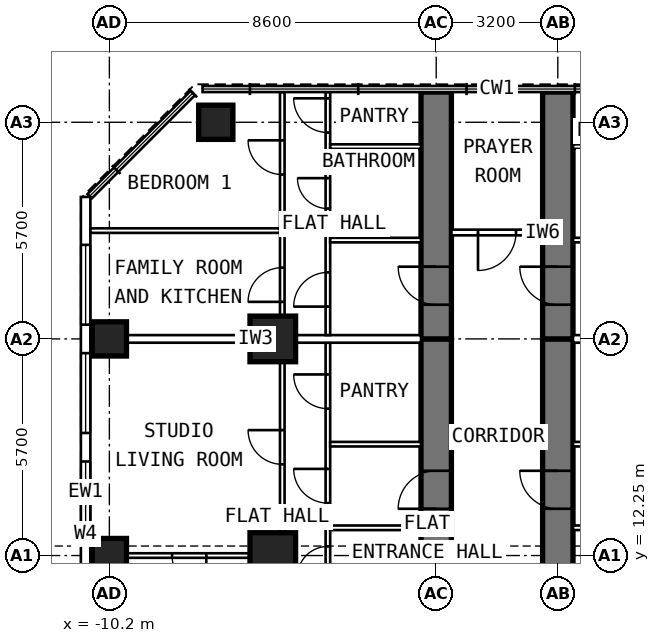
"""IFC4 building model, lengths in metres.
Left out: names, types, materials, properties, quantities, classifications, styles, units other than length and angle.
Written with IfcOpenShell. Run it as: python <this file> out.ifc"""

import sys

from ifc_helpers import new_model, si_unit, direction, frame, frame_2d, origin, origin_2d, place, context, subcontext, project, spatial, rectangle, extrude, element, fill, save


model = new_model("IFC4")
c1 = context("Model", 3, precision=1e-05, world=origin(), true_north=direction((0.0, 1.0)))
c2 = subcontext(c1, "Body", "Model", "MODEL_VIEW")
j1 = project(units=[si_unit("LENGTHUNIT", "METRE"), si_unit("PLANEANGLEUNIT", "RADIAN")], contexts=[c1])
p1 = place(None, origin())
s1 = spatial("IfcSite", under=j1, at=p1, CompositionType="ELEMENT")
p2 = place(p1, origin())
s2 = spatial("IfcBuilding", under=s1, at=p2, CompositionType="ELEMENT")
p3 = place(p2, frame((0.0, 0.0, 179.6)))
s3 = spatial("IfcBuildingStorey", under=s2, at=p3, CompositionType="ELEMENT", Elevation=179.6)
for number, where, z_axis, x_axis in (
    (1, (-10.2, 12.25, 0.0), (0.0, 0.0, 1.0), (0.0, 1.0, 0.0)),
    (2, (-10.2, 17.95, 0.0), (0.0, 0.0, 1.0), (0.0, 1.0, 0.0)),
    (3, (-7.4, 23.65, 0.0), (0.0, 0.0, 1.0), (0.0, 1.0, 0.0)),
):
    element("IfcColumn", number, at=place(p3, frame(where, z_axis=z_axis, x_axis=x_axis)), inside=s3, PredefinedType="COLUMN", context=c2, shape_type="SweptSolid", body=[
        extrude(rectangle(XDim=0.9, YDim=0.9, at=origin_2d()), origin(), (0.0, 0.0, 1.0), 3.6),
    ])
for number, where, z_axis, x_axis in (
    (4, (-5.9, 12.25, 0.0), (0.0, 0.0, 1.0), (0.0, 1.0, 0.0)),
    (5, (-5.9, 17.95, 0.0), (0.0, 0.0, 1.0), (0.0, 1.0, 0.0)),
):
    element("IfcColumn", number, at=place(p3, frame(where, z_axis=z_axis, x_axis=x_axis)), inside=s3, PredefinedType="COLUMN", context=c2, shape_type="SweptSolid", body=[
        extrude(rectangle(XDim=1.2, YDim=1.2, at=origin_2d()), origin(), (0.0, 0.0, 1.0), 3.6),
    ])
p4 = place(p3, frame((-1.6, 9.6, 0.0), z_axis=(0.0, 0.0, 1.0), x_axis=(0.0, 1.0, 0.0)))
e6 = element("IfcWall", 6, at=p4, inside=s3, PredefinedType="SHEAR", context=c2, shape_type="SweptSolid", body=[
    extrude(rectangle(XDim=8.35, YDim=0.8, at=frame_2d((4.175, 0.0))), origin(), (0.0, 0.0, 1.0), 3.6),
])
p5 = place(p4, frame((3.88, 0.0, 0.0)))
e7 = element("IfcOpeningElement", 7, at=p5, cuts=e6, PredefinedType="OPENING", context=c2, shape_type="SweptSolid", body=[
    extrude(rectangle(XDim=1.0, YDim=2.1, at=frame_2d((0.5, 1.05))), frame((0.0, 0.412, 0.0), z_axis=(0.0, -1.0, 0.0), x_axis=(1.0, 0.0, 0.0)), (0.0, 0.0, 1.0), 0.824),
])
p6 = place(p3, frame((-1.6, 17.95, 0.0), z_axis=(0.0, 0.0, 1.0), x_axis=(0.0, 1.0, 0.0)))
e8 = element("IfcWall", 8, at=p6, inside=s3, PredefinedType="SHEAR", context=c2, shape_type="SweptSolid", body=[
    extrude(rectangle(XDim=6.495, YDim=0.8, at=frame_2d((3.248, 0.0))), origin(), (0.0, 0.0, 1.0), 3.6),
])
p7 = place(p6, frame((0.9, 0.0, 0.0)))
e9 = element("IfcOpeningElement", 9, at=p7, cuts=e8, PredefinedType="OPENING", context=c2, shape_type="SweptSolid", body=[
    extrude(rectangle(XDim=1.0, YDim=2.1, at=frame_2d((0.5, 1.05))), frame((0.0, 0.412, 0.0), z_axis=(0.0, -1.0, 0.0), x_axis=(1.0, 0.0, 0.0)), (0.0, 0.0, 1.0), 0.824),
])
p8 = place(p3, frame((1.6, 9.6, 0.0), z_axis=(0.0, 0.0, 1.0), x_axis=(0.0, 1.0, 0.0)))
e10 = element("IfcWall", 10, at=p8, inside=s3, PredefinedType="SHEAR", context=c2, shape_type="SweptSolid", body=[
    extrude(rectangle(XDim=8.35, YDim=0.8, at=frame_2d((4.175, 0.0))), origin(), (0.0, 0.0, 1.0), 3.6),
])
p9 = place(p8, frame((3.88, 0.0, 0.0)))
e11 = element("IfcOpeningElement", 11, at=p9, cuts=e10, PredefinedType="OPENING", context=c2, shape_type="SweptSolid", body=[
    extrude(rectangle(XDim=1.0, YDim=2.1, at=frame_2d((0.5, 1.05))), frame((0.0, 0.412, 0.0), z_axis=(0.0, -1.0, 0.0), x_axis=(1.0, 0.0, 0.0)), (0.0, 0.0, 1.0), 0.824),
])
p10 = place(p3, frame((1.6, 17.95, 0.0), z_axis=(0.0, 0.0, 1.0), x_axis=(0.0, 1.0, 0.0)))
e12 = element("IfcWall", 12, at=p10, inside=s3, PredefinedType="SHEAR", context=c2, shape_type="SweptSolid", body=[
    extrude(rectangle(XDim=6.495, YDim=0.8, at=frame_2d((3.248, 0.0))), origin(), (0.0, 0.0, 1.0), 3.6),
])
p11 = place(p10, frame((0.9, 0.0, 0.0)))
e13 = element("IfcOpeningElement", 13, at=p11, cuts=e12, PredefinedType="OPENING", context=c2, shape_type="SweptSolid", body=[
    extrude(rectangle(XDim=1.0, YDim=2.1, at=frame_2d((0.5, 1.05))), frame((0.0, 0.412, 0.0), z_axis=(0.0, -1.0, 0.0), x_axis=(1.0, 0.0, 0.0)), (0.0, 0.0, 1.0), 0.824),
])
p12 = place(p3, frame((-10.825, 6.148, 0.0), z_axis=(0.0, 0.0, 1.0), x_axis=(0.0, 1.0, 0.0)))
e14 = element("IfcWall", 14, at=p12, inside=s3, PredefinedType="SOLIDWALL", context=c2, shape_type="SweptSolid", body=[
    extrude(rectangle(XDim=15.537, YDim=0.25, at=frame_2d((7.769, 0.0))), origin(), (0.0, 0.0, 1.0), 3.35),
])
p13 = place(p12, frame((0.777, 0.0, 0.8)))
e15 = element("IfcOpeningElement", 15, at=p13, cuts=e14, PredefinedType="OPENING", context=c2, shape_type="SweptSolid", body=[
    extrude(rectangle(XDim=2.1, YDim=1.8, at=frame_2d((1.05, 0.9))), frame((0.0, 0.137, 0.0), z_axis=(0.0, -1.0, 0.0), x_axis=(1.0, 0.0, 0.0)), (0.0, 0.0, 1.0), 0.274),
])
p14 = place(p12, frame((3.627, 0.0, 0.8)))
e16 = element("IfcOpeningElement", 16, at=p14, cuts=e14, PredefinedType="OPENING", context=c2, shape_type="SweptSolid", body=[
    extrude(rectangle(XDim=2.1, YDim=1.8, at=frame_2d((1.05, 0.9))), frame((0.0, 0.137, 0.0), z_axis=(0.0, -1.0, 0.0), x_axis=(1.0, 0.0, 0.0)), (0.0, 0.0, 1.0), 0.274),
])
p15 = place(p12, frame((6.477, 0.0, 0.8)))
e17 = element("IfcOpeningElement", 17, at=p15, cuts=e14, PredefinedType="OPENING", context=c2, shape_type="SweptSolid", body=[
    extrude(rectangle(XDim=2.1, YDim=1.8, at=frame_2d((1.05, 0.9))), frame((0.0, 0.137, 0.0), z_axis=(0.0, -1.0, 0.0), x_axis=(1.0, 0.0, 0.0)), (0.0, 0.0, 1.0), 0.274),
])
p16 = place(p12, frame((9.327, 0.0, 0.8)))
e18 = element("IfcOpeningElement", 18, at=p16, cuts=e14, PredefinedType="OPENING", context=c2, shape_type="SweptSolid", body=[
    extrude(rectangle(XDim=2.1, YDim=1.8, at=frame_2d((1.05, 0.9))), frame((0.0, 0.137, 0.0), z_axis=(0.0, -1.0, 0.0), x_axis=(1.0, 0.0, 0.0)), (0.0, 0.0, 1.0), 0.274),
])
p17 = place(p12, frame((12.177, 0.0, 0.8)))
e19 = element("IfcOpeningElement", 19, at=p17, cuts=e14, PredefinedType="OPENING", context=c2, shape_type="SweptSolid", body=[
    extrude(rectangle(XDim=2.1, YDim=1.8, at=frame_2d((1.05, 0.9))), frame((0.0, 0.137, 0.0), z_axis=(0.0, -1.0, 0.0), x_axis=(1.0, 0.0, 0.0)), (0.0, 0.0, 1.0), 0.274),
])
p18 = place(p3, frame((-4.45, 10.05, 0.0), z_axis=(0.0, 0.0, 1.0), x_axis=(0.0, 1.0, 0.0)))
e20 = element("IfcWall", 20, at=p18, inside=s3, PredefinedType="PARTITIONING", context=c2, shape_type="SweptSolid", body=[
    extrude(rectangle(XDim=7.8, YDim=0.12, at=frame_2d((3.9, 0.0))), origin(), (0.0, 0.0, 1.0), 3.35),
])
p19 = place(p18, frame((1.64, 0.0, 0.0)))
e21 = element("IfcOpeningElement", 21, at=p19, cuts=e20, PredefinedType="OPENING", context=c2, shape_type="SweptSolid", body=[
    extrude(rectangle(XDim=0.8, YDim=2.1, at=frame_2d((0.4, 1.05))), frame((0.0, 0.072, 0.0), z_axis=(0.0, -1.0, 0.0), x_axis=(1.0, 0.0, 0.0)), (0.0, 0.0, 1.0), 0.144),
])
p20 = place(p18, frame((3.58, 0.0, 0.0)))
e22 = element("IfcOpeningElement", 22, at=p20, cuts=e20, PredefinedType="OPENING", context=c2, shape_type="SweptSolid", body=[
    extrude(rectangle(XDim=0.9, YDim=2.1, at=frame_2d((0.45, 1.05))), frame((0.0, 0.072, 0.0), z_axis=(0.0, -1.0, 0.0), x_axis=(1.0, 0.0, 0.0)), (0.0, 0.0, 1.0), 0.144),
])
p21 = place(p18, frame((6.065, 0.0, 0.0)))
e23 = element("IfcOpeningElement", 23, at=p21, cuts=e20, PredefinedType="OPENING", context=c2, shape_type="SweptSolid", body=[
    extrude(rectangle(XDim=0.9, YDim=2.1, at=frame_2d((0.45, 1.05))), frame((0.0, 0.072, 0.0), z_axis=(0.0, -1.0, 0.0), x_axis=(1.0, 0.0, 0.0)), (0.0, 0.0, 1.0), 0.144),
])
p22 = place(p3, frame((-5.65, 9.6, 0.0), z_axis=(0.0, 0.0, 1.0), x_axis=(0.0, 1.0, 0.0)))
e24 = element("IfcWall", 24, at=p22, inside=s3, PredefinedType="PARTITIONING", context=c2, shape_type="SweptSolid", body=[
    extrude(rectangle(XDim=8.1, YDim=0.12, at=frame_2d((4.05, 0.0))), origin(), (0.0, 0.0, 1.0), 3.35),
])
p23 = place(p22, frame((5.05, 0.0, 0.0)))
e25 = element("IfcOpeningElement", 25, at=p23, cuts=e24, PredefinedType="OPENING", context=c2, shape_type="SweptSolid", body=[
    extrude(rectangle(XDim=0.9, YDim=2.1, at=frame_2d((0.45, 1.05))), frame((0.0, 0.072, 0.0), z_axis=(0.0, -1.0, 0.0), x_axis=(1.0, 0.0, 0.0)), (0.0, 0.0, 1.0), 0.144),
])
p24 = place(p3, frame((-5.71, 12.25, 0.0), z_axis=(0.0, 0.0, 1.0), x_axis=(-1.0, 0.0, 0.0)))
e26 = element("IfcWall", 26, at=p24, inside=s3, PredefinedType="PARTITIONING", context=c2, shape_type="SweptSolid", body=[
    extrude(rectangle(XDim=4.99, YDim=0.12, at=frame_2d((2.495, 0.0))), origin(), (0.0, 0.0, 1.0), 2.45),
])
p25 = place(p24, frame((1.94, 0.0, 0.0)))
e27 = element("IfcOpeningElement", 27, at=p25, cuts=e26, PredefinedType="OPENING", context=c2, shape_type="SweptSolid", body=[
    extrude(rectangle(XDim=0.9, YDim=2.1, at=frame_2d((0.45, 1.05))), frame((0.0, 0.072, 0.0), z_axis=(0.0, -1.0, 0.0), x_axis=(1.0, 0.0, 0.0)), (0.0, 0.0, 1.0), 0.144),
])
for number, where, z_axis, x_axis in (
    (28, (-2.0, 12.98, 0.0), (0.0, 0.0, 1.0), (-1.0, 0.0, 0.0)),
    (29, (-2.0, 15.18, 0.0), (0.0, 0.0, 1.0), (-1.0, 0.0, 0.0)),
):
    element("IfcWall", number, at=place(p3, frame(where, z_axis=z_axis, x_axis=x_axis)), inside=s3, PredefinedType="PARTITIONING", context=c2, shape_type="SweptSolid", body=[
        extrude(rectangle(XDim=2.39, YDim=0.12, at=frame_2d((1.195, 0.0))), origin(), (0.0, 0.0, 1.0), 3.35),
    ])
p26 = place(p3, frame((-4.45, 18.05, 0.0), z_axis=(0.0, 0.0, 1.0), x_axis=(0.0, 1.0, 0.0)))
e30 = element("IfcWall", 30, at=p26, inside=s3, PredefinedType="PARTITIONING", context=c2, shape_type="SweptSolid", body=[
    extrude(rectangle(XDim=6.395, YDim=0.12, at=frame_2d((3.198, 0.0))), origin(), (0.0, 0.0, 1.0), 3.35),
])
p27 = place(p26, frame((0.75, 0.0, 0.0)))
e31 = element("IfcOpeningElement", 31, at=p27, cuts=e30, PredefinedType="OPENING", context=c2, shape_type="SweptSolid", body=[
    extrude(rectangle(XDim=0.9, YDim=2.1, at=frame_2d((0.45, 1.05))), frame((0.0, 0.072, 0.0), z_axis=(0.0, -1.0, 0.0), x_axis=(1.0, 0.0, 0.0)), (0.0, 0.0, 1.0), 0.144),
])
p28 = place(p26, frame((3.33, 0.0, 0.0)))
e32 = element("IfcOpeningElement", 32, at=p28, cuts=e30, PredefinedType="OPENING", context=c2, shape_type="SweptSolid", body=[
    extrude(rectangle(XDim=0.8, YDim=2.1, at=frame_2d((0.4, 1.05))), frame((0.0, 0.072, 0.0), z_axis=(0.0, -1.0, 0.0), x_axis=(1.0, 0.0, 0.0)), (0.0, 0.0, 1.0), 0.144),
])
p29 = place(p26, frame((5.33, 0.0, 0.0)))
e33 = element("IfcOpeningElement", 33, at=p29, cuts=e30, PredefinedType="OPENING", context=c2, shape_type="SweptSolid", body=[
    extrude(rectangle(XDim=0.9, YDim=2.1, at=frame_2d((0.45, 1.05))), frame((0.0, 0.072, 0.0), z_axis=(0.0, -1.0, 0.0), x_axis=(1.0, 0.0, 0.0)), (0.0, 0.0, 1.0), 0.144),
])
p30 = place(p3, frame((-5.65, 18.05, 0.0), z_axis=(0.0, 0.0, 1.0), x_axis=(0.0, 1.0, 0.0)))
e34 = element("IfcWall", 34, at=p30, inside=s3, PredefinedType="PARTITIONING", context=c2, shape_type="SweptSolid", body=[
    extrude(rectangle(XDim=6.395, YDim=0.12, at=frame_2d((3.198, 0.0))), origin(), (0.0, 0.0, 1.0), 3.35),
])
p31 = place(p30, frame((0.875, 0.0, 0.0)))
e35 = element("IfcOpeningElement", 35, at=p31, cuts=e34, PredefinedType="OPENING", context=c2, shape_type="SweptSolid", body=[
    extrude(rectangle(XDim=0.9, YDim=2.1, at=frame_2d((0.45, 1.05))), frame((0.0, 0.072, 0.0), z_axis=(0.0, -1.0, 0.0), x_axis=(1.0, 0.0, 0.0)), (0.0, 0.0, 1.0), 0.144),
])
p32 = place(p30, frame((4.225, 0.0, 0.0)))
e36 = element("IfcOpeningElement", 36, at=p32, cuts=e34, PredefinedType="OPENING", context=c2, shape_type="SweptSolid", body=[
    extrude(rectangle(XDim=0.9, YDim=2.1, at=frame_2d((0.45, 1.05))), frame((0.0, 0.072, 0.0), z_axis=(0.0, -1.0, 0.0), x_axis=(1.0, 0.0, 0.0)), (0.0, 0.0, 1.0), 0.144),
])
p33 = place(p3, frame((-5.71, 20.8, 0.0), z_axis=(0.0, 0.0, 1.0), x_axis=(-1.0, 0.0, 0.0)))
e37 = element("IfcWall", 37, at=p33, inside=s3, PredefinedType="PARTITIONING", context=c2, shape_type="SweptSolid", body=[
    extrude(rectangle(XDim=4.99, YDim=0.12, at=frame_2d((2.495, 0.0))), origin(), (0.0, 0.0, 1.0), 3.35),
])
for number, where, z_axis, x_axis in (
    (38, (-2.0, 20.55, 0.0), (0.0, 0.0, 1.0), (-1.0, 0.0, 0.0)),
    (39, (-2.0, 23.01, 0.0), (0.0, 0.0, 1.0), (-1.0, 0.0, 0.0)),
):
    element("IfcWall", number, at=place(p3, frame(where, z_axis=z_axis, x_axis=x_axis)), inside=s3, PredefinedType="PARTITIONING", context=c2, shape_type="SweptSolid", body=[
        extrude(rectangle(XDim=2.39, YDim=0.12, at=frame_2d((1.195, 0.0))), origin(), (0.0, 0.0, 1.0), 3.35),
    ])
p34 = place(p3, frame((-2.0, 17.95, 0.0), z_axis=(0.0, 0.0, 1.0), x_axis=(-1.0, 0.0, 0.0)))
e40 = element("IfcWall", 40, at=p34, inside=s3, PredefinedType="PARTITIONING", context=c2, shape_type="SweptSolid", body=[
    extrude(rectangle(XDim=8.7, YDim=0.2, at=frame_2d((4.35, 0.0))), origin(), (0.0, 0.0, 1.0), 2.45),
])
for number, where, z_axis, x_axis in (
    (41, (2.0, 12.98, 0.0), (0.0, 0.0, 1.0), (1.0, 0.0, 0.0)),
    (42, (2.0, 15.18, 0.0), (0.0, 0.0, 1.0), (1.0, 0.0, 0.0)),
    (43, (2.0, 20.55, 0.0), (0.0, 0.0, 1.0), (1.0, 0.0, 0.0)),
    (44, (2.0, 23.01, 0.0), (0.0, 0.0, 1.0), (1.0, 0.0, 0.0)),
):
    element("IfcWall", number, at=place(p3, frame(where, z_axis=z_axis, x_axis=x_axis)), inside=s3, PredefinedType="PARTITIONING", context=c2, shape_type="SweptSolid", body=[
        extrude(rectangle(XDim=2.39, YDim=0.12, at=frame_2d((1.195, 0.0))), origin(), (0.0, 0.0, 1.0), 3.35),
    ])
p35 = place(p3, frame((2.0, 17.95, 0.0), z_axis=(0.0, 0.0, 1.0), x_axis=(1.0, 0.0, 0.0)))
e45 = element("IfcWall", 45, at=p35, inside=s3, PredefinedType="PARTITIONING", context=c2, shape_type="SweptSolid", body=[
    extrude(rectangle(XDim=8.7, YDim=0.2, at=frame_2d((4.35, 0.0))), origin(), (0.0, 0.0, 1.0), 2.45),
])
p36 = place(p3, frame((1.2, 20.75, 0.0), z_axis=(0.0, 0.0, 1.0), x_axis=(-1.0, 0.0, 0.0)))
e46 = element("IfcWall", 46, at=p36, inside=s3, PredefinedType="PARTITIONING", context=c2, shape_type="SweptSolid", body=[
    extrude(rectangle(XDim=2.4, YDim=0.15, at=frame_2d((1.2, 0.0))), origin(), (0.0, 0.0, 1.0), 3.35),
])
p37 = place(p36, frame((0.7, 0.0, 0.0)))
e47 = element("IfcOpeningElement", 47, at=p37, cuts=e46, PredefinedType="OPENING", context=c2, shape_type="SweptSolid", body=[
    extrude(rectangle(XDim=1.0, YDim=2.1, at=frame_2d((0.5, 1.05))), frame((0.0, 0.087, 0.0), z_axis=(0.0, -1.0, 0.0), x_axis=(1.0, 0.0, 0.0)), (0.0, 0.0, 1.0), 0.174),
])
p38 = place(p15, origin())
e48 = element("IfcWindow", 48, at=p38, inside=s3, PartitioningType="SINGLE_PANEL", PredefinedType="WINDOW", context=c2, shape_type="SweptSolid", body=[
    extrude(rectangle(XDim=2.1, YDim=1.8, at=frame_2d((1.05, 0.9))), frame((0.0, 0.03, 0.0), z_axis=(0.0, -1.0, 0.0), x_axis=(1.0, 0.0, 0.0)), (0.0, 0.0, 1.0), 0.06),
])
fill(e17, e48)
p39 = place(p16, origin())
e49 = element("IfcWindow", 49, at=p39, inside=s3, PartitioningType="SINGLE_PANEL", PredefinedType="WINDOW", context=c2, shape_type="SweptSolid", body=[
    extrude(rectangle(XDim=2.1, YDim=1.8, at=frame_2d((1.05, 0.9))), frame((0.0, 0.03, 0.0), z_axis=(0.0, -1.0, 0.0), x_axis=(1.0, 0.0, 0.0)), (0.0, 0.0, 1.0), 0.06),
])
fill(e18, e49)
p40 = place(p17, origin())
e50 = element("IfcWindow", 50, at=p40, inside=s3, PartitioningType="SINGLE_PANEL", PredefinedType="WINDOW", context=c2, shape_type="SweptSolid", body=[
    extrude(rectangle(XDim=2.1, YDim=1.8, at=frame_2d((1.05, 0.9))), frame((0.0, 0.03, 0.0), z_axis=(0.0, -1.0, 0.0), x_axis=(1.0, 0.0, 0.0)), (0.0, 0.0, 1.0), 0.06),
])
fill(e19, e50)
p41 = place(p25, origin())
e51 = element("IfcDoor", 51, at=p41, inside=s3, OperationType="SINGLE_SWING_LEFT", PredefinedType="DOOR", context=c2, shape_type="SweptSolid", body=[
    extrude(rectangle(XDim=0.9, YDim=2.1, at=frame_2d((0.45, 1.05))), frame((0.0, 0.025, 0.0), z_axis=(0.0, -1.0, 0.0), x_axis=(1.0, 0.0, 0.0)), (0.0, 0.0, 1.0), 0.05),
])
fill(e27, e51)
p42 = place(p5, origin())
e52 = element("IfcDoor", 52, at=p42, inside=s3, OperationType="SINGLE_SWING_LEFT", PredefinedType="DOOR", context=c2, shape_type="SweptSolid", body=[
    extrude(rectangle(XDim=1.0, YDim=2.1, at=frame_2d((0.5, 1.05))), frame((0.0, 0.15, 0.0), z_axis=(0.0, -1.0, 0.0), x_axis=(1.0, 0.0, 0.0)), (0.0, 0.0, 1.0), 0.3),
])
fill(e7, e52)
p43 = place(p23, origin())
e53 = element("IfcDoor", 53, at=p43, inside=s3, OperationType="SINGLE_SWING_RIGHT", PredefinedType="DOOR", context=c2, shape_type="SweptSolid", body=[
    extrude(rectangle(XDim=0.9, YDim=2.1, at=frame_2d((0.45, 1.05))), frame((0.0, 0.025, 0.0), z_axis=(0.0, -1.0, 0.0), x_axis=(1.0, 0.0, 0.0)), (0.0, 0.0, 1.0), 0.05),
])
fill(e25, e53)
p44 = place(p19, origin())
e54 = element("IfcDoor", 54, at=p44, inside=s3, OperationType="SINGLE_SWING_LEFT", PredefinedType="DOOR", context=c2, shape_type="SweptSolid", body=[
    extrude(rectangle(XDim=0.8, YDim=2.1, at=frame_2d((0.4, 1.05))), frame((0.0, 0.025, 0.0), z_axis=(0.0, -1.0, 0.0), x_axis=(1.0, 0.0, 0.0)), (0.0, 0.0, 1.0), 0.05),
])
fill(e21, e54)
p45 = place(p20, origin())
e55 = element("IfcDoor", 55, at=p45, inside=s3, OperationType="SINGLE_SWING_RIGHT", PredefinedType="DOOR", context=c2, shape_type="SweptSolid", body=[
    extrude(rectangle(XDim=0.9, YDim=2.1, at=frame_2d((0.45, 1.05))), frame((0.0, 0.025, 0.0), z_axis=(0.0, -1.0, 0.0), x_axis=(1.0, 0.0, 0.0)), (0.0, 0.0, 1.0), 0.05),
])
fill(e22, e55)
p46 = place(p21, origin())
e56 = element("IfcDoor", 56, at=p46, inside=s3, OperationType="SINGLE_SWING_RIGHT", PredefinedType="DOOR", context=c2, shape_type="SweptSolid", body=[
    extrude(rectangle(XDim=0.9, YDim=2.1, at=frame_2d((0.45, 1.05))), frame((0.0, 0.025, 0.0), z_axis=(0.0, -1.0, 0.0), x_axis=(1.0, 0.0, 0.0)), (0.0, 0.0, 1.0), 0.05),
])
fill(e23, e56)
p47 = place(p7, origin())
e57 = element("IfcDoor", 57, at=p47, inside=s3, OperationType="SINGLE_SWING_RIGHT", PredefinedType="DOOR", context=c2, shape_type="SweptSolid", body=[
    extrude(rectangle(XDim=1.0, YDim=2.1, at=frame_2d((0.5, 1.05))), frame((0.0, 0.15, 0.0), z_axis=(0.0, -1.0, 0.0), x_axis=(1.0, 0.0, 0.0)), (0.0, 0.0, 1.0), 0.3),
])
fill(e9, e57)
p48 = place(p31, origin())
e58 = element("IfcDoor", 58, at=p48, inside=s3, OperationType="SINGLE_SWING_LEFT", PredefinedType="DOOR", context=c2, shape_type="SweptSolid", body=[
    extrude(rectangle(XDim=0.9, YDim=2.1, at=frame_2d((0.45, 1.05))), frame((0.0, 0.025, 0.0), z_axis=(0.0, -1.0, 0.0), x_axis=(1.0, 0.0, 0.0)), (0.0, 0.0, 1.0), 0.05),
])
fill(e35, e58)
p49 = place(p32, origin())
e59 = element("IfcDoor", 59, at=p49, inside=s3, OperationType="SINGLE_SWING_RIGHT", PredefinedType="DOOR", context=c2, shape_type="SweptSolid", body=[
    extrude(rectangle(XDim=0.9, YDim=2.1, at=frame_2d((0.45, 1.05))), frame((0.0, 0.025, 0.0), z_axis=(0.0, -1.0, 0.0), x_axis=(1.0, 0.0, 0.0)), (0.0, 0.0, 1.0), 0.05),
])
fill(e36, e59)
p50 = place(p27, origin())
e60 = element("IfcDoor", 60, at=p50, inside=s3, OperationType="SINGLE_SWING_LEFT", PredefinedType="DOOR", context=c2, shape_type="SweptSolid", body=[
    extrude(rectangle(XDim=0.9, YDim=2.1, at=frame_2d((0.45, 1.05))), frame((0.0, 0.025, 0.0), z_axis=(0.0, -1.0, 0.0), x_axis=(1.0, 0.0, 0.0)), (0.0, 0.0, 1.0), 0.05),
])
fill(e31, e60)
p51 = place(p28, origin())
e61 = element("IfcDoor", 61, at=p51, inside=s3, OperationType="SINGLE_SWING_RIGHT", PredefinedType="DOOR", context=c2, shape_type="SweptSolid", body=[
    extrude(rectangle(XDim=0.8, YDim=2.1, at=frame_2d((0.4, 1.05))), frame((0.0, 0.025, 0.0), z_axis=(0.0, -1.0, 0.0), x_axis=(1.0, 0.0, 0.0)), (0.0, 0.0, 1.0), 0.05),
])
fill(e32, e61)
p52 = place(p29, origin())
e62 = element("IfcDoor", 62, at=p52, inside=s3, OperationType="SINGLE_SWING_RIGHT", PredefinedType="DOOR", context=c2, shape_type="SweptSolid", body=[
    extrude(rectangle(XDim=0.9, YDim=2.1, at=frame_2d((0.45, 1.05))), frame((0.0, 0.025, 0.0), z_axis=(0.0, -1.0, 0.0), x_axis=(1.0, 0.0, 0.0)), (0.0, 0.0, 1.0), 0.05),
])
fill(e33, e62)
p53 = place(p9, origin())
e63 = element("IfcDoor", 63, at=p53, inside=s3, OperationType="SINGLE_SWING_RIGHT", PredefinedType="DOOR", context=c2, shape_type="SweptSolid", body=[
    extrude(rectangle(XDim=1.0, YDim=2.1, at=frame_2d((0.5, 1.05))), frame((0.0, 0.15, 0.0), z_axis=(0.0, -1.0, 0.0), x_axis=(1.0, 0.0, 0.0)), (0.0, 0.0, 1.0), 0.3),
])
fill(e11, e63)
p54 = place(p11, origin())
e64 = element("IfcDoor", 64, at=p54, inside=s3, OperationType="SINGLE_SWING_RIGHT", PredefinedType="DOOR", context=c2, shape_type="SweptSolid", body=[
    extrude(rectangle(XDim=1.0, YDim=2.1, at=frame_2d((0.5, 1.05))), frame((0.0, 0.15, 0.0), z_axis=(0.0, -1.0, 0.0), x_axis=(1.0, 0.0, 0.0)), (0.0, 0.0, 1.0), 0.3),
])
fill(e13, e64)
p55 = place(p37, origin())
e65 = element("IfcDoor", 65, at=p55, inside=s3, OperationType="SINGLE_SWING_RIGHT", PredefinedType="DOOR", context=c2, shape_type="SweptSolid", body=[
    extrude(rectangle(XDim=1.0, YDim=2.1, at=frame_2d((0.5, 1.05))), frame((0.0, 0.025, 0.0), z_axis=(0.0, -1.0, 0.0), x_axis=(1.0, 0.0, 0.0)), (0.0, 0.0, 1.0), 0.05),
])
fill(e47, e65)
save(model, sys.argv[1])
